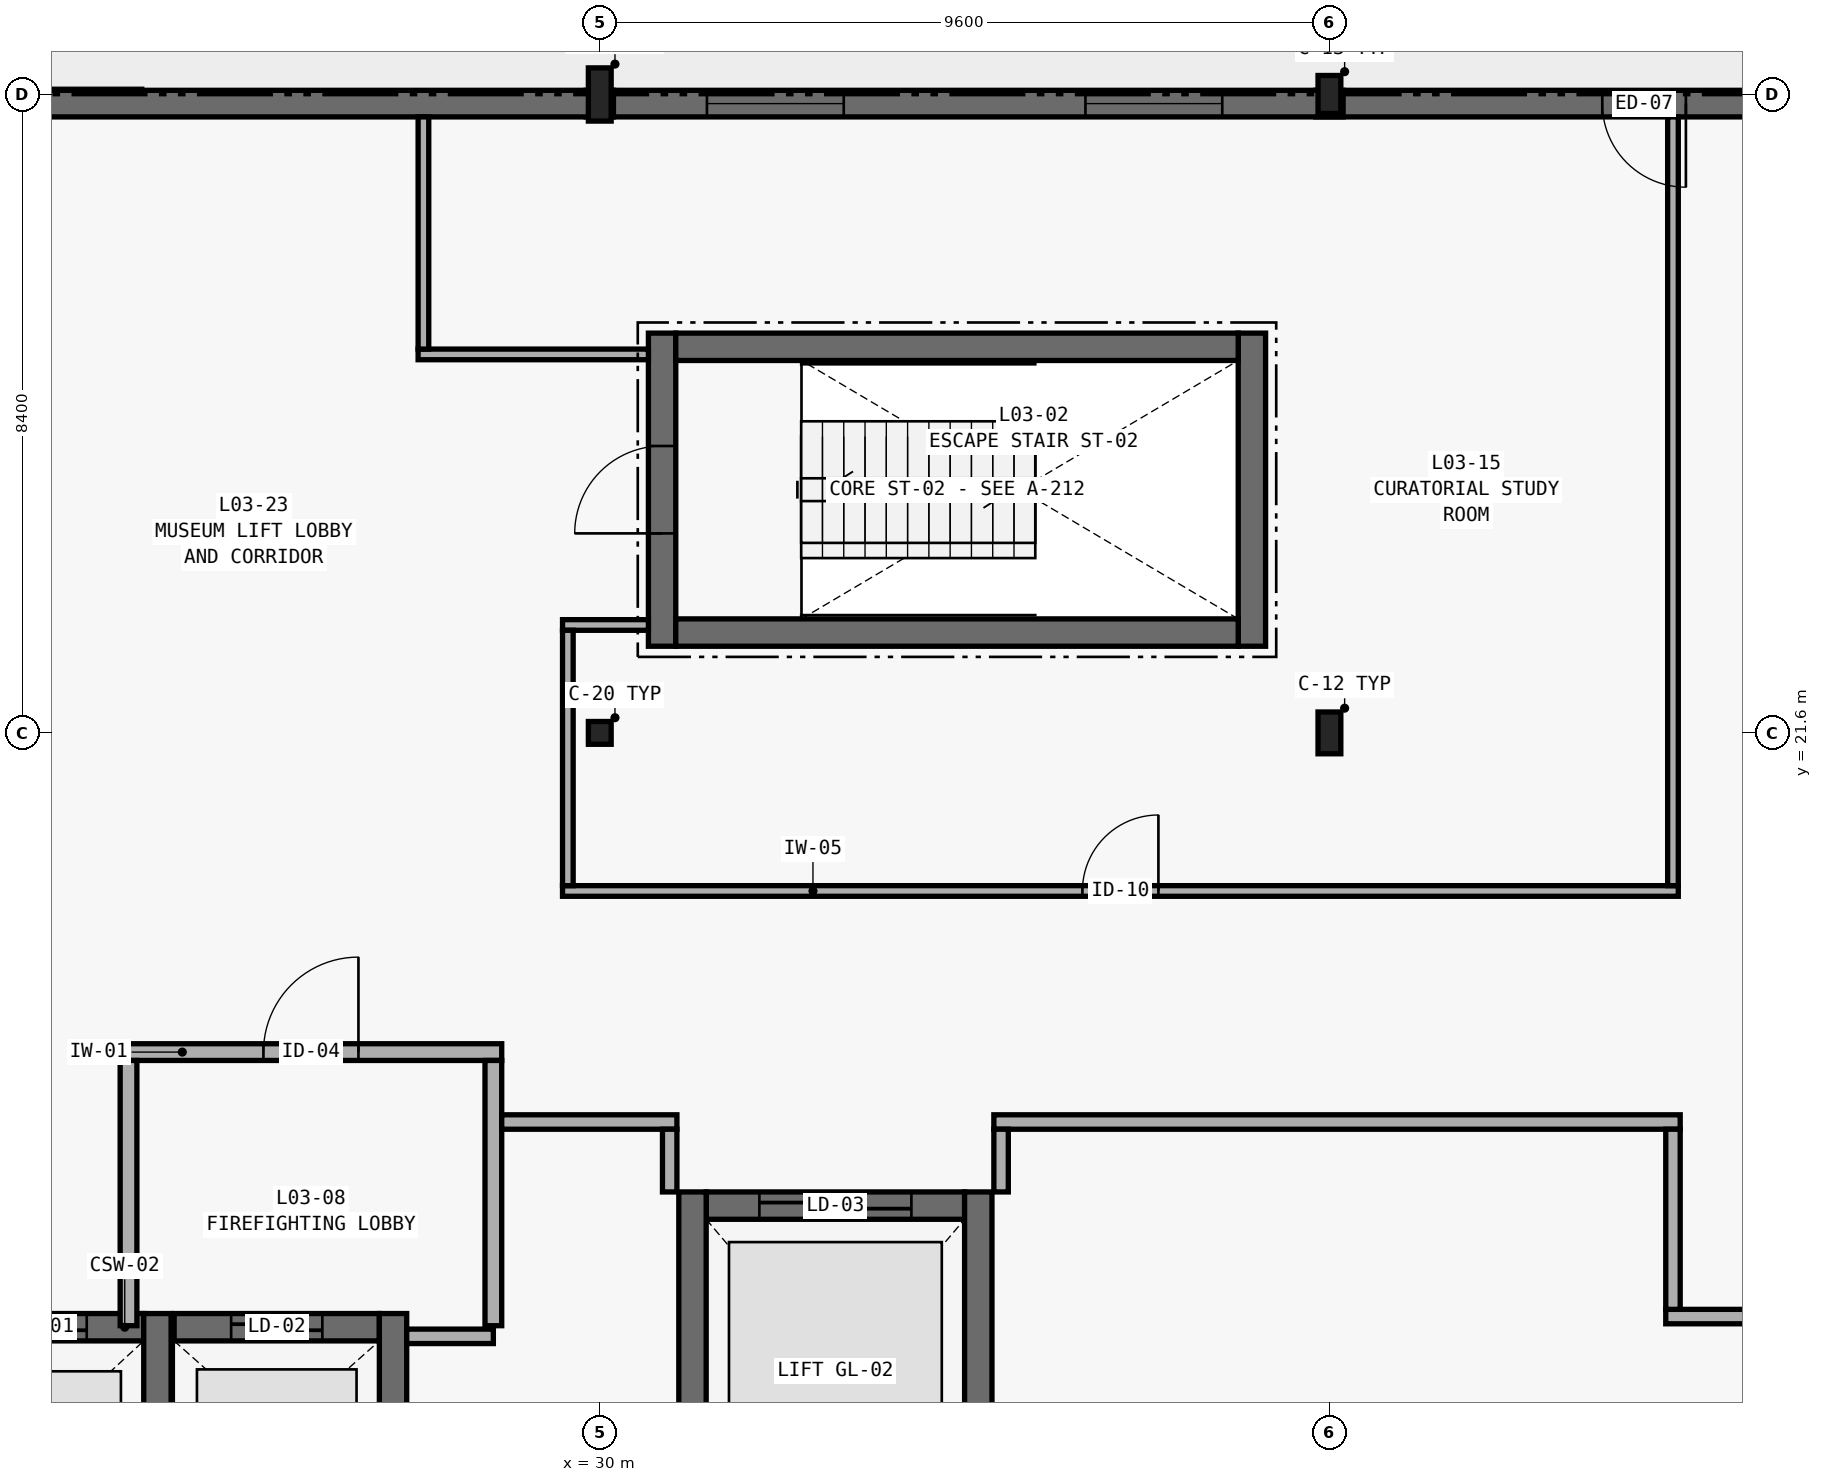
"""IFC4 building model, lengths in metres.
Left out: names, types, materials, properties, quantities, classifications, styles, units other than length and angle.
Written with IfcOpenShell. Run it as: python <this file> out.ifc"""

import sys

from ifc_helpers import new_model, si_unit, direction, frame, frame_2d, origin, origin_2d, place, context, subcontext, project, spatial, rectangle, hollow_rectangle, i_section, extrude, element, fill, save


model = new_model("IFC4")
c1 = context("Model", 3, precision=1e-05, world=origin(), true_north=direction((0.0, 1.0)))
c2 = subcontext(c1, "Body", "Model", "MODEL_VIEW")
j1 = project(units=[si_unit("LENGTHUNIT", "METRE"), si_unit("PLANEANGLEUNIT", "RADIAN")], contexts=[c1])
p1 = place(None, origin())
s1 = spatial("IfcSite", under=j1, at=p1, CompositionType="ELEMENT")
p2 = place(p1, origin())
s2 = spatial("IfcBuilding", under=s1, at=p2, CompositionType="ELEMENT")
p3 = place(p2, frame((0.0, 0.0, 17.1)))
s3 = spatial("IfcBuildingStorey", under=s2, at=p3, CompositionType="ELEMENT", Elevation=17.1)
p4 = place(p3, frame((30.0, 21.6, 0.0), z_axis=(0.0, 0.0, 1.0), x_axis=(1.0, 0.0, 0.0)))
e1 = element("IfcColumn", 1, at=p4, inside=s3, PredefinedType="COLUMN", context=c2, shape_type="SweptSolid", body=[
    extrude(hollow_rectangle(XDim=0.3, YDim=0.3, WallThickness=0.016, at=origin_2d()), origin(), (0.0, 0.0, 1.0), 4.2),
])
p5 = place(p3, frame((30.0, 30.0, 0.0), z_axis=(0.0, 0.0, 1.0), x_axis=(1.0, 0.0, 0.0)))
e2 = element("IfcColumn", 2, at=p5, inside=s3, PredefinedType="COLUMN", context=c2, shape_type="SweptSolid", body=[
    extrude(i_section(OverallWidth=0.3, OverallDepth=0.7, WebThickness=0.017, FlangeThickness=0.032, FilletRadius=0.027, at=origin_2d()), origin(), (0.0, 0.0, 1.0), 4.2),
])
p6 = place(p3, frame((39.6, 21.6, 0.0), z_axis=(0.0, 0.0, 1.0), x_axis=(1.0, 0.0, 0.0)))
e3 = element("IfcColumn", 3, at=p6, inside=s3, PredefinedType="COLUMN", context=c2, shape_type="SweptSolid", body=[
    extrude(i_section(OverallWidth=0.3, OverallDepth=0.55, WebThickness=0.015, FlangeThickness=0.029, FilletRadius=0.027, at=origin_2d()), origin(), (0.0, 0.0, 1.0), 4.2),
])
p7 = place(p3, frame((39.6, 30.0, 0.0), z_axis=(0.0, 0.0, 1.0), x_axis=(1.0, 0.0, 0.0)))
e4 = element("IfcColumn", 4, at=p7, inside=s3, PredefinedType="COLUMN", context=c2, shape_type="SweptSolid", body=[
    extrude(i_section(OverallWidth=0.3, OverallDepth=0.5, WebThickness=0.014, FlangeThickness=0.028, FilletRadius=0.027, at=origin_2d()), origin(), (0.0, 0.0, 1.0), 4.2),
])
p8 = place(p3, frame((48.06, 29.88, 0.0), z_axis=(0.0, 0.0, 1.0), x_axis=(-1.0, 0.0, 0.0)))
e5 = element("IfcWall", 5, at=p8, inside=s3, PredefinedType="STANDARD", context=c2, shape_type="SweptSolid", body=[
    extrude(rectangle(XDim=8.64, YDim=0.35, at=frame_2d((4.32, 0.0))), origin(), (0.0, 0.0, 1.0), 3.9),
])
p9 = place(p8, frame((3.77, 0.0, 0.0)))
e6 = element("IfcOpeningElement", 6, at=p9, cuts=e5, PredefinedType="OPENING", context=c2, shape_type="SweptSolid", body=[
    extrude(rectangle(XDim=1.1, YDim=2.3, at=frame_2d((0.55, 1.15))), frame((0.0, 0.19, 0.0), z_axis=(0.0, -1.0, 0.0), x_axis=(1.0, 0.0, 0.0)), (0.0, 0.0, 1.0), 0.38),
])
p10 = place(p3, frame((39.78, 29.88, 0.0), z_axis=(0.0, 0.0, 1.0), x_axis=(-1.0, 0.0, 0.0)))
e7 = element("IfcWall", 7, at=p10, inside=s3, PredefinedType="STANDARD", context=c2, shape_type="SweptSolid", body=[
    extrude(rectangle(XDim=9.96, YDim=0.35, at=frame_2d((4.98, 0.0))), origin(), (0.0, 0.0, 1.0), 3.9),
])
p11 = place(p10, frame((1.59, 0.0, 0.9)))
e8 = element("IfcOpeningElement", 8, at=p11, cuts=e7, PredefinedType="OPENING", context=c2, shape_type="SweptSolid", body=[
    extrude(rectangle(XDim=1.8, YDim=1.1, at=frame_2d((0.9, 0.55))), frame((0.0, 0.19, 0.0), z_axis=(0.0, -1.0, 0.0), x_axis=(1.0, 0.0, 0.0)), (0.0, 0.0, 1.0), 0.38),
])
p12 = place(p10, frame((6.57, 0.0, 0.9)))
e9 = element("IfcOpeningElement", 9, at=p12, cuts=e7, PredefinedType="OPENING", context=c2, shape_type="SweptSolid", body=[
    extrude(rectangle(XDim=1.8, YDim=1.1, at=frame_2d((0.9, 0.55))), frame((0.0, 0.19, 0.0), z_axis=(0.0, -1.0, 0.0), x_axis=(1.0, 0.0, 0.0)), (0.0, 0.0, 1.0), 0.38),
])
p13 = place(p3, frame((30.18, 29.88, 0.0), z_axis=(0.0, 0.0, 1.0), x_axis=(-1.0, 0.0, 0.0)))
e10 = element("IfcWall", 10, at=p13, inside=s3, PredefinedType="STANDARD", context=c2, shape_type="SweptSolid", body=[
    extrude(rectangle(XDim=9.96, YDim=0.35, at=frame_2d((4.98, 0.0))), origin(), (0.0, 0.0, 1.0), 3.9),
])
p14 = place(p3, frame((30.82, 22.74, 0.0), z_axis=(0.0, 0.0, 1.0), x_axis=(0.0, 1.0, 0.0)))
e11 = element("IfcWall", 11, at=p14, inside=s3, PredefinedType="SHEAR", context=c2, shape_type="SweptSolid", body=[
    extrude(rectangle(XDim=4.12, YDim=0.36, at=frame_2d((2.06, 0.0))), origin(), (0.0, 0.0, 1.0), 3.94),
])
p15 = place(p14, frame((1.485, 0.0, 0.0)))
e12 = element("IfcOpeningElement", 12, at=p15, cuts=e11, PredefinedType="OPENING", context=c2, shape_type="SweptSolid", body=[
    extrude(rectangle(XDim=1.15, YDim=2.15, at=frame_2d((0.575, 1.075))), frame((0.0, 0.195, 0.0), z_axis=(0.0, -1.0, 0.0), x_axis=(1.0, 0.0, 0.0)), (0.0, 0.0, 1.0), 0.39),
])
p16 = place(p3, frame((38.58, 22.74, 0.0), z_axis=(0.0, 0.0, 1.0), x_axis=(0.0, 1.0, 0.0)))
e13 = element("IfcWall", 13, at=p16, inside=s3, PredefinedType="SHEAR", context=c2, shape_type="SweptSolid", body=[
    extrude(rectangle(XDim=4.12, YDim=0.36, at=frame_2d((2.06, 0.0))), origin(), (0.0, 0.0, 1.0), 3.94),
])
for number, where, z_axis, x_axis in (
    (14, (31.0, 26.68, 0.0), (0.0, 0.0, 1.0), (1.0, 0.0, 0.0)),
    (15, (31.0, 22.92, 0.0), (0.0, 0.0, 1.0), (1.0, 0.0, 0.0)),
):
    element("IfcWall", number, at=place(p3, frame(where, z_axis=z_axis, x_axis=x_axis)), inside=s3, PredefinedType="SHEAR", context=c2, shape_type="SweptSolid", body=[
        extrude(rectangle(XDim=7.4, YDim=0.36, at=frame_2d((3.7, 0.0))), origin(), (0.0, 0.0, 1.0), 3.94),
    ])
p17 = place(p3, frame((21.4, 13.78, 0.0), z_axis=(0.0, 0.0, 1.0), x_axis=(1.0, 0.0, 0.0)))
e16 = element("IfcWall", 16, at=p17, inside=s3, PredefinedType="SHEAR", context=c2, shape_type="SweptSolid", body=[
    extrude(rectangle(XDim=2.6, YDim=0.36, at=frame_2d((1.3, 0.0))), origin(), (0.0, 0.0, 1.0), 3.94),
])
p18 = place(p17, frame((0.75, 0.0, 0.0)))
e17 = element("IfcOpeningElement", 17, at=p18, cuts=e16, PredefinedType="OPENING", context=c2, shape_type="SweptSolid", body=[
    extrude(rectangle(XDim=1.1, YDim=2.15, at=frame_2d((0.55, 1.075))), frame((0.0, 0.195, 0.0), z_axis=(0.0, -1.0, 0.0), x_axis=(1.0, 0.0, 0.0)), (0.0, 0.0, 1.0), 0.39),
])
p19 = place(p3, frame((24.18, 10.84, 0.0), z_axis=(0.0, 0.0, 1.0), x_axis=(0.0, 1.0, 0.0)))
e18 = element("IfcWall", 18, at=p19, inside=s3, PredefinedType="SHEAR", context=c2, shape_type="SweptSolid", body=[
    extrude(rectangle(XDim=3.12, YDim=0.36, at=frame_2d((1.56, 0.0))), origin(), (0.0, 0.0, 1.0), 3.94),
])
p20 = place(p3, frame((24.4, 13.78, 0.0), z_axis=(0.0, 0.0, 1.0), x_axis=(1.0, 0.0, 0.0)))
e19 = element("IfcWall", 19, at=p20, inside=s3, PredefinedType="SHEAR", context=c2, shape_type="SweptSolid", body=[
    extrude(rectangle(XDim=2.7, YDim=0.36, at=frame_2d((1.35, 0.0))), origin(), (0.0, 0.0, 1.0), 3.94),
])
p21 = place(p20, frame((0.75, 0.0, 0.0)))
e20 = element("IfcOpeningElement", 20, at=p21, cuts=e19, PredefinedType="OPENING", context=c2, shape_type="SweptSolid", body=[
    extrude(rectangle(XDim=1.2, YDim=2.15, at=frame_2d((0.6, 1.075))), frame((0.0, 0.195, 0.0), z_axis=(0.0, -1.0, 0.0), x_axis=(1.0, 0.0, 0.0)), (0.0, 0.0, 1.0), 0.39),
])
p22 = place(p3, frame((27.28, 10.84, 0.0), z_axis=(0.0, 0.0, 1.0), x_axis=(0.0, 1.0, 0.0)))
e21 = element("IfcWall", 21, at=p22, inside=s3, PredefinedType="SHEAR", context=c2, shape_type="SweptSolid", body=[
    extrude(rectangle(XDim=3.12, YDim=0.36, at=frame_2d((1.56, 0.0))), origin(), (0.0, 0.0, 1.0), 3.94),
])
p23 = place(p3, frame((23.69, 17.4, 0.0), z_axis=(0.0, 0.0, 1.0), x_axis=(1.0, 0.0, 0.0)))
e22 = element("IfcWall", 22, at=p23, inside=s3, PredefinedType="PARTITIONING", context=c2, shape_type="SweptSolid", body=[
    extrude(rectangle(XDim=5.02, YDim=0.22, at=frame_2d((2.51, 0.0))), origin(), (0.0, 0.0, 1.0), 2.82),
])
p24 = place(p23, frame((1.885, 0.0, 0.0)))
e23 = element("IfcOpeningElement", 23, at=p24, cuts=e22, PredefinedType="OPENING", context=c2, shape_type="SweptSolid", body=[
    extrude(rectangle(XDim=1.25, YDim=2.15, at=frame_2d((0.625, 1.075))), frame((0.0, 0.125, 0.0), z_axis=(0.0, -1.0, 0.0), x_axis=(1.0, 0.0, 0.0)), (0.0, 0.0, 1.0), 0.25),
])
for number, where, z_axis, x_axis in (
    (24, (23.8, 13.8, 0.0), (0.0, 0.0, 1.0), (0.0, 1.0, 0.0)),
    (25, (28.6, 13.8, 0.0), (0.0, 0.0, 1.0), (0.0, 1.0, 0.0)),
):
    element("IfcWall", number, at=place(p3, frame(where, z_axis=z_axis, x_axis=x_axis)), inside=s3, PredefinedType="PARTITIONING", context=c2, shape_type="SweptSolid", body=[
        extrude(rectangle(XDim=3.49, YDim=0.22, at=frame_2d((1.745, 0.0))), origin(), (0.0, 0.0, 1.0), 2.82),
    ])
p25 = place(p3, frame((31.4, 15.38, 0.0), z_axis=(0.0, 0.0, 1.0), x_axis=(1.0, 0.0, 0.0)))
e26 = element("IfcWall", 26, at=p25, inside=s3, PredefinedType="SHEAR", context=c2, shape_type="SweptSolid", body=[
    extrude(rectangle(XDim=3.4, YDim=0.36, at=frame_2d((1.7, 0.0))), origin(), (0.0, 0.0, 1.0), 3.94),
])
p26 = place(p25, frame((0.7, 0.0, 0.0)))
e27 = element("IfcOpeningElement", 27, at=p26, cuts=e26, PredefinedType="OPENING", context=c2, shape_type="SweptSolid", body=[
    extrude(rectangle(XDim=2.0, YDim=2.4, at=frame_2d((1.0, 1.2))), frame((0.0, 0.195, 0.0), z_axis=(0.0, -1.0, 0.0), x_axis=(1.0, 0.0, 0.0)), (0.0, 0.0, 1.0), 0.39),
])
for number, where, z_axis, x_axis in (
    (28, (31.22, 10.84, 0.0), (0.0, 0.0, 1.0), (0.0, 1.0, 0.0)),
    (29, (34.98, 10.84, 0.0), (0.0, 0.0, 1.0), (0.0, 1.0, 0.0)),
):
    element("IfcWall", number, at=place(p3, frame(where, z_axis=z_axis, x_axis=x_axis)), inside=s3, PredefinedType="SHEAR", context=c2, shape_type="SweptSolid", body=[
        extrude(rectangle(XDim=4.72, YDim=0.36, at=frame_2d((2.36, 0.0))), origin(), (0.0, 0.0, 1.0), 3.94),
    ])
p27 = place(p3, frame((27.46, 13.66, 0.0), z_axis=(0.0, 0.0, 1.0), x_axis=(1.0, 0.0, 0.0)))
e30 = element("IfcWall", 30, at=p27, inside=s3, PredefinedType="PARTITIONING", context=c2, shape_type="SweptSolid", body=[
    extrude(rectangle(XDim=1.14, YDim=0.19, at=frame_2d((0.57, 0.0))), origin(), (0.0, 0.0, 1.0), 2.82),
])
p28 = place(p3, frame((44.025, 13.92, 0.0), z_axis=(0.0, 0.0, 1.0), x_axis=(1.0, 0.0, 0.0)))
e31 = element("IfcWall", 31, at=p28, inside=s3, PredefinedType="PARTITIONING", context=c2, shape_type="SweptSolid", body=[
    extrude(rectangle(XDim=3.68, YDim=0.19, at=frame_2d((1.84, 0.0))), origin(), (0.0, 0.0, 1.0), 2.82),
])
p29 = place(p3, frame((28.71, 16.48, 0.0), z_axis=(0.0, 0.0, 1.0), x_axis=(1.0, 0.0, 0.0)))
e32 = element("IfcWall", 32, at=p29, inside=s3, PredefinedType="PARTITIONING", context=c2, shape_type="SweptSolid", body=[
    extrude(rectangle(XDim=2.305, YDim=0.19, at=frame_2d((1.152, 0.0))), origin(), (0.0, 0.0, 1.0), 2.82),
])
p30 = place(p3, frame((35.185, 16.48, 0.0), z_axis=(0.0, 0.0, 1.0), x_axis=(1.0, 0.0, 0.0)))
e33 = element("IfcWall", 33, at=p30, inside=s3, PredefinedType="PARTITIONING", context=c2, shape_type="SweptSolid", body=[
    extrude(rectangle(XDim=9.03, YDim=0.19, at=frame_2d((4.515, 0.0))), origin(), (0.0, 0.0, 1.0), 2.82),
])
p31 = place(p3, frame((29.51, 19.52, 0.0), z_axis=(0.0, 0.0, 1.0), x_axis=(1.0, 0.0, 0.0)))
e34 = element("IfcWall", 34, at=p31, inside=s3, PredefinedType="PARTITIONING", context=c2, shape_type="SweptSolid", body=[
    extrude(rectangle(XDim=14.68, YDim=0.14, at=frame_2d((7.34, 0.0))), origin(), (0.0, 0.0, 1.0), 2.82),
])
p32 = place(p31, frame((6.84, 0.0, 0.0)))
e35 = element("IfcOpeningElement", 35, at=p32, cuts=e34, PredefinedType="OPENING", context=c2, shape_type="SweptSolid", body=[
    extrude(rectangle(XDim=1.0, YDim=2.15, at=frame_2d((0.5, 1.075))), frame((0.0, 0.085, 0.0), z_axis=(0.0, -1.0, 0.0), x_axis=(1.0, 0.0, 0.0)), (0.0, 0.0, 1.0), 0.17),
])
p33 = place(p3, frame((29.51, 23.02, 0.0), z_axis=(0.0, 0.0, 1.0), x_axis=(1.0, 0.0, 0.0)))
e36 = element("IfcWall", 36, at=p33, inside=s3, PredefinedType="PARTITIONING", context=c2, shape_type="SweptSolid", body=[
    extrude(rectangle(XDim=1.13, YDim=0.14, at=frame_2d((0.565, 0.0))), origin(), (0.0, 0.0, 1.0), 2.82),
])
p34 = place(p3, frame((27.61, 26.58, 0.0), z_axis=(0.0, 0.0, 1.0), x_axis=(1.0, 0.0, 0.0)))
e37 = element("IfcWall", 37, at=p34, inside=s3, PredefinedType="PARTITIONING", context=c2, shape_type="SweptSolid", body=[
    extrude(rectangle(XDim=3.03, YDim=0.14, at=frame_2d((1.515, 0.0))), origin(), (0.0, 0.0, 1.0), 2.82),
])
p35 = place(p3, frame((27.68, 26.65, 0.0), z_axis=(0.0, 0.0, 1.0), x_axis=(0.0, 1.0, 0.0)))
e38 = element("IfcWall", 38, at=p35, inside=s3, PredefinedType="PARTITIONING", context=c2, shape_type="SweptSolid", body=[
    extrude(rectangle(XDim=3.055, YDim=0.14, at=frame_2d((1.528, 0.0))), origin(), (0.0, 0.0, 1.0), 2.82),
])
p36 = place(p3, frame((29.58, 19.59, 0.0), z_axis=(0.0, 0.0, 1.0), x_axis=(0.0, 1.0, 0.0)))
e39 = element("IfcWall", 39, at=p36, inside=s3, PredefinedType="PARTITIONING", context=c2, shape_type="SweptSolid", body=[
    extrude(rectangle(XDim=3.36, YDim=0.14, at=frame_2d((1.68, 0.0))), origin(), (0.0, 0.0, 1.0), 2.82),
])
for number, where, z_axis, x_axis in (
    (40, (30.92, 15.56, 0.0), (0.0, 0.0, 1.0), (0.0, 1.0, 0.0)),
    (41, (35.28, 15.56, 0.0), (0.0, 0.0, 1.0), (0.0, 1.0, 0.0)),
):
    element("IfcWall", number, at=place(p3, frame(where, z_axis=z_axis, x_axis=x_axis)), inside=s3, PredefinedType="PARTITIONING", context=c2, shape_type="SweptSolid", body=[
        extrude(rectangle(XDim=0.825, YDim=0.19, at=frame_2d((0.413, 0.0))), origin(), (0.0, 0.0, 1.0), 2.82),
    ])
p37 = place(p3, frame((44.12, 14.015, 0.0), z_axis=(0.0, 0.0, 1.0), x_axis=(0.0, 1.0, 0.0)))
e42 = element("IfcWall", 42, at=p37, inside=s3, PredefinedType="PARTITIONING", context=c2, shape_type="SweptSolid", body=[
    extrude(rectangle(XDim=2.37, YDim=0.19, at=frame_2d((1.185, 0.0))), origin(), (0.0, 0.0, 1.0), 2.82),
])
p38 = place(p3, frame((44.12, 19.59, 0.0), z_axis=(0.0, 0.0, 1.0), x_axis=(0.0, 1.0, 0.0)))
e43 = element("IfcWall", 43, at=p38, inside=s3, PredefinedType="PARTITIONING", context=c2, shape_type="SweptSolid", body=[
    extrude(rectangle(XDim=10.115, YDim=0.14, at=frame_2d((5.058, 0.0))), origin(), (0.0, 0.0, 1.0), 2.82),
])
p39 = place(p9, origin())
e44 = element("IfcDoor", 44, at=p39, inside=s3, OperationType="SINGLE_SWING_LEFT", PredefinedType="DOOR", context=c2, shape_type="SweptSolid", body=[
    extrude(rectangle(XDim=1.1, YDim=2.3, at=frame_2d((0.55, 1.15))), frame((0.0, 0.025, 0.0), z_axis=(0.0, -1.0, 0.0), x_axis=(1.0, 0.0, 0.0)), (0.0, 0.0, 1.0), 0.05),
])
fill(e6, e44)
p40 = place(p11, origin())
e45 = element("IfcWindow", 45, at=p40, inside=s3, PartitioningType="SINGLE_PANEL", PredefinedType="WINDOW", context=c2, shape_type="SweptSolid", body=[
    extrude(rectangle(XDim=1.8, YDim=1.1, at=frame_2d((0.9, 0.55))), frame((0.0, 0.03, 0.0), z_axis=(0.0, -1.0, 0.0), x_axis=(1.0, 0.0, 0.0)), (0.0, 0.0, 1.0), 0.06),
])
fill(e8, e45)
p41 = place(p12, origin())
e46 = element("IfcWindow", 46, at=p41, inside=s3, PartitioningType="SINGLE_PANEL", PredefinedType="WINDOW", context=c2, shape_type="SweptSolid", body=[
    extrude(rectangle(XDim=1.8, YDim=1.1, at=frame_2d((0.9, 0.55))), frame((0.0, 0.03, 0.0), z_axis=(0.0, -1.0, 0.0), x_axis=(1.0, 0.0, 0.0)), (0.0, 0.0, 1.0), 0.06),
])
fill(e9, e46)
p42 = place(p15, origin())
e47 = element("IfcDoor", 47, at=p42, inside=s3, OperationType="SINGLE_SWING_LEFT", PredefinedType="DOOR", context=c2, shape_type="SweptSolid", body=[
    extrude(rectangle(XDim=1.15, YDim=2.15, at=frame_2d((0.575, 1.075))), frame((0.0, 0.025, 0.0), z_axis=(0.0, -1.0, 0.0), x_axis=(1.0, 0.0, 0.0)), (0.0, 0.0, 1.0), 0.05),
])
fill(e12, e47)
p43 = place(p18, origin())
e48 = element("IfcDoor", 48, at=p43, inside=s3, OperationType="DOUBLE_DOOR_SLIDING", PredefinedType="DOOR", context=c2, shape_type="SweptSolid", body=[
    extrude(rectangle(XDim=1.1, YDim=2.15, at=frame_2d((0.55, 1.075))), frame((0.0, 0.025, 0.0), z_axis=(0.0, -1.0, 0.0), x_axis=(1.0, 0.0, 0.0)), (0.0, 0.0, 1.0), 0.05),
])
fill(e17, e48)
p44 = place(p21, origin())
e49 = element("IfcDoor", 49, at=p44, inside=s3, OperationType="DOUBLE_DOOR_SLIDING", PredefinedType="DOOR", context=c2, shape_type="SweptSolid", body=[
    extrude(rectangle(XDim=1.2, YDim=2.15, at=frame_2d((0.6, 1.075))), frame((0.0, 0.025, 0.0), z_axis=(0.0, -1.0, 0.0), x_axis=(1.0, 0.0, 0.0)), (0.0, 0.0, 1.0), 0.05),
])
fill(e20, e49)
p45 = place(p24, origin())
e50 = element("IfcDoor", 50, at=p45, inside=s3, OperationType="SINGLE_SWING_RIGHT", PredefinedType="DOOR", context=c2, shape_type="SweptSolid", body=[
    extrude(rectangle(XDim=1.25, YDim=2.15, at=frame_2d((0.625, 1.075))), frame((0.0, 0.025, 0.0), z_axis=(0.0, -1.0, 0.0), x_axis=(1.0, 0.0, 0.0)), (0.0, 0.0, 1.0), 0.05),
])
fill(e23, e50)
p46 = place(p26, origin())
e51 = element("IfcDoor", 51, at=p46, inside=s3, OperationType="DOUBLE_DOOR_SLIDING", PredefinedType="DOOR", context=c2, shape_type="SweptSolid", body=[
    extrude(rectangle(XDim=2.0, YDim=2.4, at=frame_2d((1.0, 1.2))), frame((0.0, 0.025, 0.0), z_axis=(0.0, -1.0, 0.0), x_axis=(1.0, 0.0, 0.0)), (0.0, 0.0, 1.0), 0.05),
])
fill(e27, e51)
p47 = place(p32, origin())
e52 = element("IfcDoor", 52, at=p47, inside=s3, OperationType="SINGLE_SWING_RIGHT", PredefinedType="DOOR", context=c2, shape_type="SweptSolid", body=[
    extrude(rectangle(XDim=1.0, YDim=2.15, at=frame_2d((0.5, 1.075))), frame((0.0, 0.025, 0.0), z_axis=(0.0, -1.0, 0.0), x_axis=(1.0, 0.0, 0.0)), (0.0, 0.0, 1.0), 0.05),
])
fill(e35, e52)
save(model, sys.argv[1])
